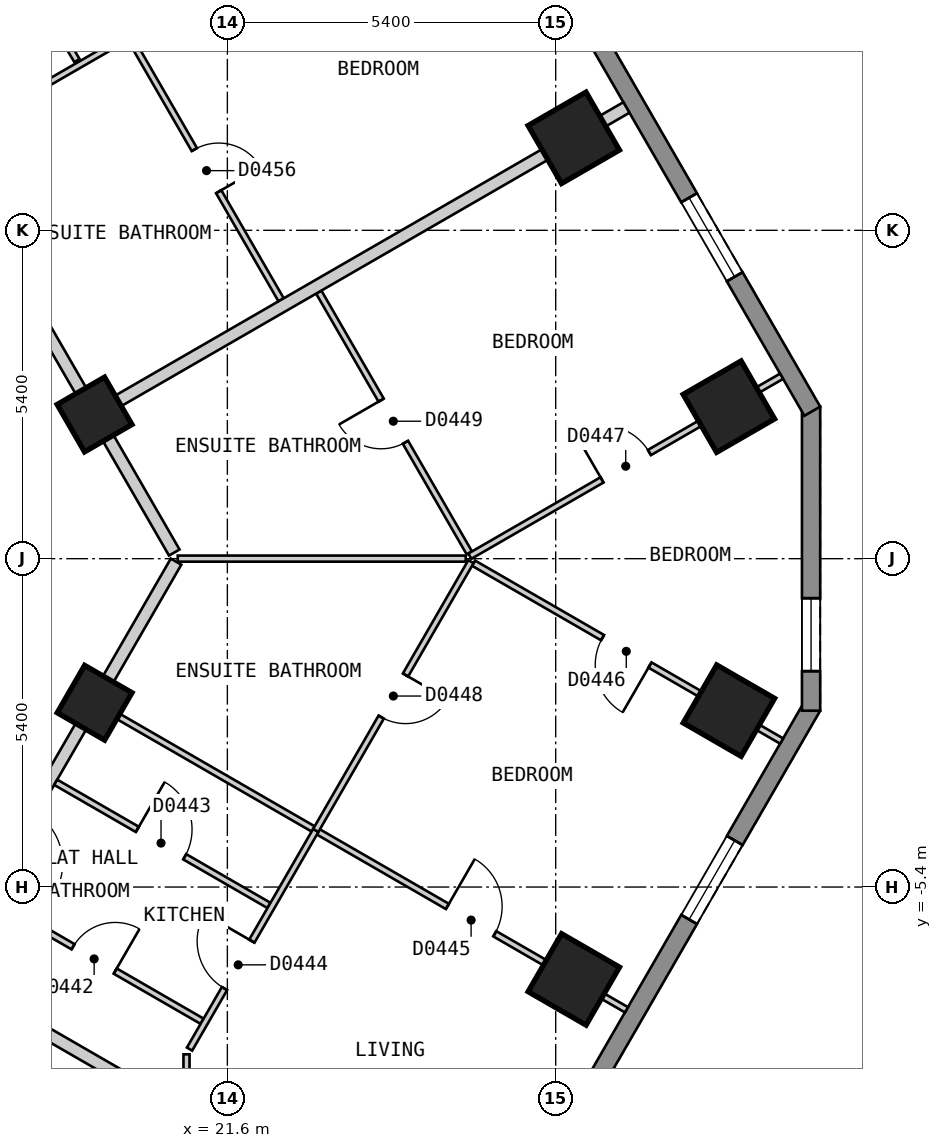
"""IFC4 building model, lengths in metres.
Left out: names, types, materials, properties, quantities, classifications, styles, units other than length and angle.
Written with IfcOpenShell. Run it as: python <this file> out.ifc"""

import sys

from ifc_helpers import new_model, si_unit, direction, frame, frame_2d, origin, origin_2d, place, context, subcontext, project, spatial, polyline, rectangle, outline, extrude, element, fill, save


model = new_model("IFC4")
c1 = context("Model", 3, precision=1e-05, world=origin(), true_north=direction((0.0, 1.0)))
c2 = subcontext(c1, "Body", "Model", "MODEL_VIEW")
j1 = project(units=[si_unit("LENGTHUNIT", "METRE"), si_unit("PLANEANGLEUNIT", "RADIAN")], contexts=[c1])
p1 = place(None, origin())
s1 = spatial("IfcSite", under=j1, at=p1, CompositionType="ELEMENT")
p2 = place(p1, origin())
s2 = spatial("IfcBuilding", under=s1, at=p2, CompositionType="ELEMENT")
p3 = place(p2, frame((0.0, 0.0, 26.4)))
s3 = spatial("IfcBuildingStorey", under=s2, at=p3, CompositionType="ELEMENT", Elevation=26.4)
for number, where, z_axis, x_axis in (
    (1, (27.298, -6.919, 0.0), (0.0, 0.0, 1.0), (0.5, 0.866, 0.0)),
    (2, (29.849, -2.499, 0.0), (0.0, 0.0, 1.0), (0.5, 0.866, 0.0)),
    (3, (29.848, 2.5, 0.0), (0.0, 0.0, 1.0), (-0.5, 0.866, 0.0)),
    (4, (27.297, 6.921, 0.0), (0.0, 0.0, 1.0), (-0.5, 0.866, 0.0)),
):
    element("IfcColumn", number, at=place(p3, frame(where, z_axis=z_axis, x_axis=x_axis)), inside=s3, PredefinedType="COLUMN", context=c2, shape_type="SweptSolid", body=[
        extrude(rectangle(XDim=1.1, YDim=1.1, at=origin_2d()), origin(), (0.0, 0.0, 1.0), 3.0),
    ])
for number, where, z_axis, x_axis in (
    (5, (19.417, -2.369, 0.0), (0.0, 0.0, 1.0), (0.5, 0.866, 0.0)),
    (6, (19.416, 2.371, 0.0), (0.0, 0.0, 1.0), (-0.5, 0.866, 0.0)),
):
    element("IfcColumn", number, at=place(p3, frame(where, z_axis=z_axis, x_axis=x_axis)), inside=s3, PredefinedType="COLUMN", context=c2, shape_type="SweptSolid", body=[
        extrude(rectangle(XDim=0.9, YDim=0.9, at=origin_2d()), origin(), (0.0, 0.0, 1.0), 3.0),
    ])
p4 = place(p3, frame((17.71, -25.825, 0.0), z_axis=(0.0, 0.0, 1.0), x_axis=(0.500001938803, 0.866024284413, 0.0)))
e7 = element("IfcWall", 7, at=p4, inside=s3, PredefinedType="SOLIDWALL", context=c2, shape_type="SweptSolid", body=[
    extrude(outline(polyline([(0.0, -0.15), (27.02, -0.15), (26.94, 0.15), (0.08, 0.15), (0.0, -0.15)])), origin(), (0.0, 0.0, 1.0), 2.7),
])
p5 = place(p4, frame((2.553, 0.0, 0.15)))
e8 = element("IfcOpeningElement", 8, at=p5, cuts=e7, PredefinedType="OPENING", context=c2, shape_type="SweptSolid", body=[
    extrude(rectangle(XDim=1.5, YDim=2.1, at=frame_2d((0.75, 1.05))), frame((0.0, 0.16, 0.0), z_axis=(0.0, -1.0, 0.0), x_axis=(1.0, 0.0, 0.0)), (0.0, 0.0, 1.0), 0.32),
])
p6 = place(p4, frame((7.658, 0.0, 0.15)))
e9 = element("IfcOpeningElement", 9, at=p6, cuts=e7, PredefinedType="OPENING", context=c2, shape_type="SweptSolid", body=[
    extrude(rectangle(XDim=1.5, YDim=2.1, at=frame_2d((0.75, 1.05))), frame((0.0, 0.16, 0.0), z_axis=(0.0, -1.0, 0.0), x_axis=(1.0, 0.0, 0.0)), (0.0, 0.0, 1.0), 0.32),
])
p7 = place(p4, frame((12.761, 0.0, 0.15)))
e10 = element("IfcOpeningElement", 10, at=p7, cuts=e7, PredefinedType="OPENING", context=c2, shape_type="SweptSolid", body=[
    extrude(rectangle(XDim=1.5, YDim=2.1, at=frame_2d((0.75, 1.05))), frame((0.0, 0.16, 0.0), z_axis=(0.0, -1.0, 0.0), x_axis=(1.0, 0.0, 0.0)), (0.0, 0.0, 1.0), 0.32),
])
p8 = place(p4, frame((17.865, 0.0, 0.15)))
e11 = element("IfcOpeningElement", 11, at=p8, cuts=e7, PredefinedType="OPENING", context=c2, shape_type="SweptSolid", body=[
    extrude(rectangle(XDim=1.5, YDim=2.1, at=frame_2d((0.75, 1.05))), frame((0.0, 0.16, 0.0), z_axis=(0.0, -1.0, 0.0), x_axis=(1.0, 0.0, 0.0)), (0.0, 0.0, 1.0), 0.32),
])
p9 = place(p4, frame((22.969, 0.0, 0.15)))
e12 = element("IfcOpeningElement", 12, at=p9, cuts=e7, PredefinedType="OPENING", context=c2, shape_type="SweptSolid", body=[
    extrude(rectangle(XDim=1.5, YDim=2.1, at=frame_2d((0.75, 1.05))), frame((0.0, 0.16, 0.0), z_axis=(0.0, -1.0, 0.0), x_axis=(1.0, 0.0, 0.0)), (0.0, 0.0, 1.0), 0.32),
])
p10 = place(p3, frame((31.2, -2.5, 0.0), z_axis=(0.0, 0.0, 1.0), x_axis=(0.0, 1.0, 0.0)))
e13 = element("IfcWall", 13, at=p10, inside=s3, PredefinedType="SOLIDWALL", context=c2, shape_type="SweptSolid", body=[
    extrude(outline(polyline([(0.0, -0.15), (5.0, -0.15), (4.92, 0.15), (0.08, 0.15), (0.0, -0.15)])), origin(), (0.0, 0.0, 1.0), 2.7),
])
p11 = place(p10, frame((0.65, 0.0, 0.15)))
e14 = element("IfcOpeningElement", 14, at=p11, cuts=e13, PredefinedType="OPENING", context=c2, shape_type="SweptSolid", body=[
    extrude(rectangle(XDim=1.2, YDim=2.1, at=frame_2d((0.6, 1.05))), frame((0.0, 0.16, 0.0), z_axis=(0.0, -1.0, 0.0), x_axis=(1.0, 0.0, 0.0)), (0.0, 0.0, 1.0), 0.32),
])
p12 = place(p3, frame((31.22, 2.425, 0.0), z_axis=(0.0, 0.0, 1.0), x_axis=(-0.500001938803, 0.866024284413, 0.0)))
e15 = element("IfcWall", 15, at=p12, inside=s3, PredefinedType="SOLIDWALL", context=c2, shape_type="SweptSolid", body=[
    extrude(outline(polyline([(0.0, -0.15), (27.02, -0.15), (26.94, 0.15), (0.08, 0.15), (0.0, -0.15)])), origin(), (0.0, 0.0, 1.0), 2.7),
])
p13 = place(p12, frame((2.553, 0.0, 0.15)))
e16 = element("IfcOpeningElement", 16, at=p13, cuts=e15, PredefinedType="OPENING", context=c2, shape_type="SweptSolid", body=[
    extrude(rectangle(XDim=1.5, YDim=2.1, at=frame_2d((0.75, 1.05))), frame((0.0, 0.16, 0.0), z_axis=(0.0, -1.0, 0.0), x_axis=(1.0, 0.0, 0.0)), (0.0, 0.0, 1.0), 0.32),
])
p14 = place(p12, frame((7.657, 0.0, 0.15)))
e17 = element("IfcOpeningElement", 17, at=p14, cuts=e15, PredefinedType="OPENING", context=c2, shape_type="SweptSolid", body=[
    extrude(rectangle(XDim=1.5, YDim=2.1, at=frame_2d((0.75, 1.05))), frame((0.0, 0.16, 0.0), z_axis=(0.0, -1.0, 0.0), x_axis=(1.0, 0.0, 0.0)), (0.0, 0.0, 1.0), 0.32),
])
p15 = place(p12, frame((12.761, 0.0, 0.15)))
e18 = element("IfcOpeningElement", 18, at=p15, cuts=e15, PredefinedType="OPENING", context=c2, shape_type="SweptSolid", body=[
    extrude(rectangle(XDim=1.5, YDim=2.1, at=frame_2d((0.75, 1.05))), frame((0.0, 0.16, 0.0), z_axis=(0.0, -1.0, 0.0), x_axis=(1.0, 0.0, 0.0)), (0.0, 0.0, 1.0), 0.32),
])
p16 = place(p12, frame((17.865, 0.0, 0.15)))
e19 = element("IfcOpeningElement", 19, at=p16, cuts=e15, PredefinedType="OPENING", context=c2, shape_type="SweptSolid", body=[
    extrude(rectangle(XDim=1.5, YDim=2.1, at=frame_2d((0.75, 1.05))), frame((0.0, 0.16, 0.0), z_axis=(0.0, -1.0, 0.0), x_axis=(1.0, 0.0, 0.0)), (0.0, 0.0, 1.0), 0.32),
])
p17 = place(p12, frame((22.969, 0.0, 0.15)))
e20 = element("IfcOpeningElement", 20, at=p17, cuts=e15, PredefinedType="OPENING", context=c2, shape_type="SweptSolid", body=[
    extrude(rectangle(XDim=1.5, YDim=2.1, at=frame_2d((0.75, 1.05))), frame((0.0, 0.16, 0.0), z_axis=(0.0, -1.0, 0.0), x_axis=(1.0, 0.0, 0.0)), (0.0, 0.0, 1.0), 0.32),
])
p18 = place(p3, frame((10.45, 17.9, 0.0), z_axis=(0.0, 0.0, 1.0), x_axis=(0.500034352617, -0.866005569383, 0.0)))
e21 = element("IfcWall", 21, at=p18, inside=s3, PredefinedType="PARTITIONING", context=c2, shape_type="SweptSolid", body=[
    extrude(rectangle(XDim=20.553, YDim=0.2, at=frame_2d((10.276, 0.0))), origin(), (0.0, 0.0, 1.0), 2.7),
])
p19 = place(p18, frame((9.775, 0.0, 0.0)))
e22 = element("IfcOpeningElement", 22, at=p19, cuts=e21, PredefinedType="OPENING", context=c2, shape_type="SweptSolid", body=[
    extrude(rectangle(XDim=1.0, YDim=2.1, at=frame_2d((0.5, 1.05))), frame((0.0, 0.11, 0.0), z_axis=(0.0, -1.0, 0.0), x_axis=(1.0, 0.0, 0.0)), (0.0, 0.0, 1.0), 0.22),
])
p20 = place(p18, frame((0.852, 0.0, 0.0)))
e23 = element("IfcOpeningElement", 23, at=p20, cuts=e21, PredefinedType="OPENING", context=c2, shape_type="SweptSolid", body=[
    extrude(rectangle(XDim=0.8, YDim=2.1, at=frame_2d((0.4, 1.05))), frame((0.0, 0.11, 0.0), z_axis=(0.0, -1.0, 0.0), x_axis=(1.0, 0.0, 0.0)), (0.0, 0.0, 1.0), 0.22),
])
p21 = place(p3, frame((15.707, -8.794, 0.0), z_axis=(0.0, 0.0, 1.0), x_axis=(0.500016151272, 0.866016078642, 0.0)))
e24 = element("IfcWall", 24, at=p21, inside=s3, PredefinedType="PARTITIONING", context=c2, shape_type="SweptSolid", body=[
    extrude(rectangle(XDim=10.098, YDim=0.2, at=frame_2d((5.049, 0.0))), origin(), (0.0, 0.0, 1.0), 2.7),
])
p22 = place(p21, frame((4.367, 0.0, 0.0)))
e25 = element("IfcOpeningElement", 25, at=p22, cuts=e24, PredefinedType="OPENING", context=c2, shape_type="SweptSolid", body=[
    extrude(rectangle(XDim=1.0, YDim=2.1, at=frame_2d((0.5, 1.05))), frame((0.0, 0.11, 0.0), z_axis=(0.0, -1.0, 0.0), x_axis=(1.0, 0.0, 0.0)), (0.0, 0.0, 1.0), 0.22),
])
p23 = place(p3, frame((17.485, 10.957, 0.0), z_axis=(0.0, 0.0, 1.0), x_axis=(0.510324709283, -0.859981796956, 0.0)))
e26 = element("IfcWall", 26, at=p23, inside=s3, PredefinedType="PARTITIONING", context=c2, shape_type="SweptSolid", body=[
    extrude(rectangle(XDim=3.215, YDim=0.1, at=frame_2d((1.608, 0.0))), origin(), (0.0, 0.0, 1.0), 2.7),
])
p24 = place(p3, frame((20.006, 8.548, 0.0), z_axis=(0.0, 0.0, 1.0), x_axis=(0.500055121407, -0.865993577086, 0.0)))
e27 = element("IfcWall", 27, at=p24, inside=s3, PredefinedType="PARTITIONING", context=c2, shape_type="SweptSolid", body=[
    extrude(rectangle(XDim=4.955, YDim=0.1, at=frame_2d((2.478, 0.0))), origin(), (0.0, 0.0, 1.0), 2.7),
])
p25 = place(p24, frame((2.102, 0.0, 0.0)))
e28 = element("IfcOpeningElement", 28, at=p25, cuts=e27, PredefinedType="OPENING", context=c2, shape_type="SweptSolid", body=[
    extrude(rectangle(XDim=0.8, YDim=2.1, at=frame_2d((0.4, 1.05))), frame((0.0, 0.06, 0.0), z_axis=(0.0, -1.0, 0.0), x_axis=(1.0, 0.0, 0.0)), (0.0, 0.0, 1.0), 0.12),
])
p26 = place(p3, frame((23.103, 4.384, 0.0), z_axis=(0.0, 0.0, 1.0), x_axis=(0.500029609304, -0.86600830817, 0.0)))
e29 = element("IfcWall", 29, at=p26, inside=s3, PredefinedType="PARTITIONING", context=c2, shape_type="SweptSolid", body=[
    extrude(rectangle(XDim=4.954, YDim=0.1, at=frame_2d((2.477, 0.0))), origin(), (0.0, 0.0, 1.0), 2.7),
])
p27 = place(p26, frame((2.052, 0.0, 0.0)))
e30 = element("IfcOpeningElement", 30, at=p27, cuts=e29, PredefinedType="OPENING", context=c2, shape_type="SweptSolid", body=[
    extrude(rectangle(XDim=0.8, YDim=2.1, at=frame_2d((0.4, 1.05))), frame((0.0, 0.06, 0.0), z_axis=(0.0, -1.0, 0.0), x_axis=(1.0, 0.0, 0.0)), (0.0, 0.0, 1.0), 0.12),
])
p28 = place(p3, frame((17.677, -5.582, 0.0), z_axis=(0.0, 0.0, 1.0), x_axis=(0.866015917575, -0.500016430238, 0.0)))
e31 = element("IfcWall", 31, at=p28, inside=s3, PredefinedType="PARTITIONING", context=c2, shape_type="SweptSolid", body=[
    extrude(rectangle(XDim=4.05, YDim=0.1, at=frame_2d((2.025, 0.0))), origin(), (0.0, 0.0, 1.0), 2.7),
])
p29 = place(p28, frame((1.6, 0.0, 0.0)))
e32 = element("IfcOpeningElement", 32, at=p29, cuts=e31, PredefinedType="OPENING", context=c2, shape_type="SweptSolid", body=[
    extrude(rectangle(XDim=0.8, YDim=2.1, at=frame_2d((0.4, 1.05))), frame((0.0, 0.06, 0.0), z_axis=(0.0, -1.0, 0.0), x_axis=(1.0, 0.0, 0.0)), (0.0, 0.0, 1.0), 0.12),
])
p30 = place(p3, frame((18.777, -3.677, 0.0), z_axis=(0.0, 0.0, 1.0), x_axis=(0.866000843773, -0.500042536776, 0.0)))
e33 = element("IfcWall", 33, at=p30, inside=s3, PredefinedType="PARTITIONING", context=c2, shape_type="SweptSolid", body=[
    extrude(rectangle(XDim=4.05, YDim=0.1, at=frame_2d((2.025, 0.0))), origin(), (0.0, 0.0, 1.0), 2.7),
])
p31 = place(p30, frame((1.55, 0.0, 0.0)))
e34 = element("IfcOpeningElement", 34, at=p31, cuts=e33, PredefinedType="OPENING", context=c2, shape_type="SweptSolid", body=[
    extrude(rectangle(XDim=0.9, YDim=2.1, at=frame_2d((0.45, 1.05))), frame((0.0, 0.06, 0.0), z_axis=(0.0, -1.0, 0.0), x_axis=(1.0, 0.0, 0.0)), (0.0, 0.0, 1.0), 0.12),
])
p32 = place(p3, frame((19.503, -2.419, 0.0), z_axis=(0.0, 0.0, 1.0), x_axis=(0.866047370643, -0.499961950354, 0.0)))
e35 = element("IfcWall", 35, at=p32, inside=s3, PredefinedType="PARTITIONING", context=c2, shape_type="SweptSolid", body=[
    extrude(rectangle(XDim=10.001, YDim=0.1, at=frame_2d((5.0, 0.0))), origin(), (0.0, 0.0, 1.0), 2.7),
])
p33 = place(p32, frame((6.6, 0.0, 0.0)))
e36 = element("IfcOpeningElement", 36, at=p33, cuts=e35, PredefinedType="OPENING", context=c2, shape_type="SweptSolid", body=[
    extrude(rectangle(XDim=0.9, YDim=2.1, at=frame_2d((0.45, 1.05))), frame((0.0, 0.06, 0.0), z_axis=(0.0, -1.0, 0.0), x_axis=(1.0, 0.0, 0.0)), (0.0, 0.0, 1.0), 0.12),
])
p34 = place(p3, frame((25.649, -0.074, 0.0), z_axis=(0.0, 0.0, 1.0), x_axis=(0.866059819573, -0.499940385368, 0.0)))
e37 = element("IfcWall", 37, at=p34, inside=s3, PredefinedType="PARTITIONING", context=c2, shape_type="SweptSolid", body=[
    extrude(rectangle(XDim=5.851, YDim=0.1, at=frame_2d((2.925, 0.0))), origin(), (0.0, 0.0, 1.0), 2.7),
])
p35 = place(p34, frame((2.45, 0.0, 0.0)))
e38 = element("IfcOpeningElement", 38, at=p35, cuts=e37, PredefinedType="OPENING", context=c2, shape_type="SweptSolid", body=[
    extrude(rectangle(XDim=0.9, YDim=2.1, at=frame_2d((0.45, 1.05))), frame((0.0, 0.06, 0.0), z_axis=(0.0, -1.0, 0.0), x_axis=(1.0, 0.0, 0.0)), (0.0, 0.0, 1.0), 0.12),
])
p36 = place(p3, frame((20.784, 0.001, 0.0), z_axis=(0.0, 0.0, 1.0), x_axis=(1.0, 0.0, 0.0)))
e39 = element("IfcWall", 39, at=p36, inside=s3, PredefinedType="PARTITIONING", context=c2, shape_type="SweptSolid", body=[
    extrude(rectangle(XDim=4.736, YDim=0.1, at=frame_2d((2.368, 0.0))), origin(), (0.0, 0.0, 1.0), 2.7),
])
p37 = place(p3, frame((20.978, -8.065, 0.0), z_axis=(0.0, 0.0, 1.0), x_axis=(0.499965068118, 0.866045570776, 0.0)))
e40 = element("IfcWall", 40, at=p37, inside=s3, PredefinedType="PARTITIONING", context=c2, shape_type="SweptSolid", body=[
    extrude(rectangle(XDim=4.152, YDim=0.1, at=frame_2d((2.076, 0.0))), origin(), (0.0, 0.0, 1.0), 2.7),
])
p38 = place(p37, frame((1.15, 0.0, 0.0)))
e41 = element("IfcOpeningElement", 41, at=p38, cuts=e40, PredefinedType="OPENING", context=c2, shape_type="SweptSolid", body=[
    extrude(rectangle(XDim=0.9, YDim=2.1, at=frame_2d((0.45, 1.05))), frame((0.0, 0.06, 0.0), z_axis=(0.0, -1.0, 0.0), x_axis=(1.0, 0.0, 0.0)), (0.0, 0.0, 1.0), 0.12),
])
p39 = place(p3, frame((20.928, -9.02, 0.0), z_axis=(0.0, 0.0, 1.0), x_axis=(0.0, 1.0, 0.0)))
e42 = element("IfcWall", 42, at=p39, inside=s3, PredefinedType="PARTITIONING", context=c2, shape_type="SweptSolid", body=[
    extrude(rectangle(XDim=0.869, YDim=0.1, at=frame_2d((0.435, 0.0))), origin(), (0.0, 0.0, 1.0), 2.7),
])
p40 = place(p3, frame((25.588, 0.041, 0.0), z_axis=(0.0, 0.0, 1.0), x_axis=(0.866113484451, 0.499847408768, 0.0)))
e43 = element("IfcWall", 43, at=p40, inside=s3, PredefinedType="PARTITIONING", context=c2, shape_type="SweptSolid", body=[
    extrude(rectangle(XDim=5.92, YDim=0.1, at=frame_2d((2.96, 0.0))), origin(), (0.0, 0.0, 1.0), 2.7),
])
p41 = place(p40, frame((2.51, 0.0, 0.0)))
e44 = element("IfcOpeningElement", 44, at=p41, cuts=e43, PredefinedType="OPENING", context=c2, shape_type="SweptSolid", body=[
    extrude(rectangle(XDim=0.9, YDim=2.1, at=frame_2d((0.45, 1.05))), frame((0.0, 0.06, 0.0), z_axis=(0.0, -1.0, 0.0), x_axis=(1.0, 0.0, 0.0)), (0.0, 0.0, 1.0), 0.12),
])
p42 = place(p3, frame((16.95, 6.841, 0.0), z_axis=(0.0, 0.0, 1.0), x_axis=(0.866022959057, 0.500004234368, 0.0)))
e45 = element("IfcWall", 45, at=p42, inside=s3, PredefinedType="PARTITIONING", context=c2, shape_type="SweptSolid", body=[
    extrude(rectangle(XDim=10.0, YDim=0.1, at=frame_2d((5.0, 0.0))), origin(), (0.0, 0.0, 1.0), 2.7),
])
p43 = place(p42, frame((4.795, 0.0, 0.0)))
e46 = element("IfcOpeningElement", 46, at=p43, cuts=e45, PredefinedType="OPENING", context=c2, shape_type="SweptSolid", body=[
    extrude(rectangle(XDim=0.9, YDim=2.1, at=frame_2d((0.45, 1.05))), frame((0.0, 0.06, 0.0), z_axis=(0.0, -1.0, 0.0), x_axis=(1.0, 0.0, 0.0)), (0.0, 0.0, 1.0), 0.12),
])
p44 = place(p3, frame((16.951, -6.839, 0.0), z_axis=(0.0, 0.0, 1.0), x_axis=(0.866022959057, -0.500004234368, 0.0)))
e47 = element("IfcWall", 47, at=p44, inside=s3, PredefinedType="PARTITIONING", context=c2, shape_type="SweptSolid", body=[
    extrude(rectangle(XDim=10.0, YDim=0.2, at=frame_2d((5.0, 0.0))), origin(), (0.0, 0.0, 1.0), 2.7),
])
p45 = place(p3, frame((19.503, 2.421, 0.0), z_axis=(0.0, 0.0, 1.0), x_axis=(0.866065245018, 0.499930986609, 0.0)))
e48 = element("IfcWall", 48, at=p45, inside=s3, PredefinedType="PARTITIONING", context=c2, shape_type="SweptSolid", body=[
    extrude(rectangle(XDim=10.0, YDim=0.2, at=frame_2d((5.0, 0.0))), origin(), (0.0, 0.0, 1.0), 2.7),
])
p46 = place(p3, frame((23.054, -4.469, 0.0), z_axis=(0.0, 0.0, 1.0), x_axis=(0.500023345639, 0.866011924754, 0.0)))
e49 = element("IfcWall", 49, at=p46, inside=s3, PredefinedType="PARTITIONING", context=c2, shape_type="SweptSolid", body=[
    extrude(rectangle(XDim=5.104, YDim=0.1, at=frame_2d((2.552, 0.0))), origin(), (0.0, 0.0, 1.0), 2.7),
])
p47 = place(p46, frame((2.152, 0.0, 0.0)))
e50 = element("IfcOpeningElement", 50, at=p47, cuts=e49, PredefinedType="OPENING", context=c2, shape_type="SweptSolid", body=[
    extrude(rectangle(XDim=0.8, YDim=2.1, at=frame_2d((0.4, 1.05))), frame((0.0, 0.06, 0.0), z_axis=(0.0, -1.0, 0.0), x_axis=(1.0, 0.0, 0.0)), (0.0, 0.0, 1.0), 0.12),
])
p48 = place(p9, origin())
e51 = element("IfcWindow", 51, at=p48, inside=s3, PartitioningType="SINGLE_PANEL", PredefinedType="WINDOW", context=c2, shape_type="SweptSolid", body=[
    extrude(rectangle(XDim=1.5, YDim=2.1, at=frame_2d((0.75, 1.05))), frame((0.0, 0.03, 0.0), z_axis=(0.0, -1.0, 0.0), x_axis=(1.0, 0.0, 0.0)), (0.0, 0.0, 1.0), 0.06),
])
fill(e12, e51)
p49 = place(p11, origin())
e52 = element("IfcWindow", 52, at=p49, inside=s3, PartitioningType="SINGLE_PANEL", PredefinedType="WINDOW", context=c2, shape_type="SweptSolid", body=[
    extrude(rectangle(XDim=1.2, YDim=2.1, at=frame_2d((0.6, 1.05))), frame((0.0, 0.03, 0.0), z_axis=(0.0, -1.0, 0.0), x_axis=(1.0, 0.0, 0.0)), (0.0, 0.0, 1.0), 0.06),
])
fill(e14, e52)
p50 = place(p13, origin())
e53 = element("IfcWindow", 53, at=p50, inside=s3, PartitioningType="SINGLE_PANEL", PredefinedType="WINDOW", context=c2, shape_type="SweptSolid", body=[
    extrude(rectangle(XDim=1.5, YDim=2.1, at=frame_2d((0.75, 1.05))), frame((0.0, 0.03, 0.0), z_axis=(0.0, -1.0, 0.0), x_axis=(1.0, 0.0, 0.0)), (0.0, 0.0, 1.0), 0.06),
])
fill(e16, e53)
p51 = place(p29, origin())
e54 = element("IfcDoor", 54, at=p51, inside=s3, OperationType="SINGLE_SWING_RIGHT", PredefinedType="DOOR", context=c2, shape_type="SweptSolid", body=[
    extrude(rectangle(XDim=0.8, YDim=2.1, at=frame_2d((0.4, 1.05))), frame((0.0, 0.025, 0.0), z_axis=(0.0, -1.0, 0.0), x_axis=(1.0, 0.0, 0.0)), (0.0, 0.0, 1.0), 0.05),
])
fill(e32, e54)
p52 = place(p31, origin())
e55 = element("IfcDoor", 55, at=p52, inside=s3, OperationType="SINGLE_SWING_LEFT", PredefinedType="DOOR", context=c2, shape_type="SweptSolid", body=[
    extrude(rectangle(XDim=0.9, YDim=2.1, at=frame_2d((0.45, 1.05))), frame((0.0, 0.025, 0.0), z_axis=(0.0, -1.0, 0.0), x_axis=(1.0, 0.0, 0.0)), (0.0, 0.0, 1.0), 0.05),
])
fill(e34, e55)
p53 = place(p38, origin())
e56 = element("IfcDoor", 56, at=p53, inside=s3, OperationType="SINGLE_SWING_RIGHT", PredefinedType="DOOR", context=c2, shape_type="SweptSolid", body=[
    extrude(rectangle(XDim=0.9, YDim=2.1, at=frame_2d((0.45, 1.05))), frame((0.0, 0.025, 0.0), z_axis=(0.0, -1.0, 0.0), x_axis=(1.0, 0.0, 0.0)), (0.0, 0.0, 1.0), 0.05),
])
fill(e41, e56)
p54 = place(p33, origin())
e57 = element("IfcDoor", 57, at=p54, inside=s3, OperationType="SINGLE_SWING_LEFT", PredefinedType="DOOR", context=c2, shape_type="SweptSolid", body=[
    extrude(rectangle(XDim=0.9, YDim=2.1, at=frame_2d((0.45, 1.05))), frame((0.0, 0.025, 0.0), z_axis=(0.0, -1.0, 0.0), x_axis=(1.0, 0.0, 0.0)), (0.0, 0.0, 1.0), 0.05),
])
fill(e36, e57)
p55 = place(p35, origin())
e58 = element("IfcDoor", 58, at=p55, inside=s3, OperationType="SINGLE_SWING_RIGHT", PredefinedType="DOOR", context=c2, shape_type="SweptSolid", body=[
    extrude(rectangle(XDim=0.9, YDim=2.1, at=frame_2d((0.45, 1.05))), frame((0.0, 0.025, 0.0), z_axis=(0.0, -1.0, 0.0), x_axis=(1.0, 0.0, 0.0)), (0.0, 0.0, 1.0), 0.05),
])
fill(e38, e58)
p56 = place(p41, origin())
e59 = element("IfcDoor", 59, at=p56, inside=s3, OperationType="SINGLE_SWING_LEFT", PredefinedType="DOOR", context=c2, shape_type="SweptSolid", body=[
    extrude(rectangle(XDim=0.9, YDim=2.1, at=frame_2d((0.45, 1.05))), frame((0.0, 0.025, 0.0), z_axis=(0.0, -1.0, 0.0), x_axis=(1.0, 0.0, 0.0)), (0.0, 0.0, 1.0), 0.05),
])
fill(e44, e59)
p57 = place(p47, origin())
e60 = element("IfcDoor", 60, at=p57, inside=s3, OperationType="SINGLE_SWING_RIGHT", PredefinedType="DOOR", context=c2, shape_type="SweptSolid", body=[
    extrude(rectangle(XDim=0.8, YDim=2.1, at=frame_2d((0.4, 1.05))), frame((0.0, 0.025, 0.0), z_axis=(0.0, -1.0, 0.0), x_axis=(1.0, 0.0, 0.0)), (0.0, 0.0, 1.0), 0.05),
])
fill(e50, e60)
p58 = place(p27, origin())
e61 = element("IfcDoor", 61, at=p58, inside=s3, OperationType="SINGLE_SWING_LEFT", PredefinedType="DOOR", context=c2, shape_type="SweptSolid", body=[
    extrude(rectangle(XDim=0.8, YDim=2.1, at=frame_2d((0.4, 1.05))), frame((0.0, 0.025, 0.0), z_axis=(0.0, -1.0, 0.0), x_axis=(1.0, 0.0, 0.0)), (0.0, 0.0, 1.0), 0.05),
])
fill(e30, e61)
p59 = place(p25, origin())
e62 = element("IfcDoor", 62, at=p59, inside=s3, OperationType="SINGLE_SWING_RIGHT", PredefinedType="DOOR", context=c2, shape_type="SweptSolid", body=[
    extrude(rectangle(XDim=0.8, YDim=2.1, at=frame_2d((0.4, 1.05))), frame((0.0, 0.025, 0.0), z_axis=(0.0, -1.0, 0.0), x_axis=(1.0, 0.0, 0.0)), (0.0, 0.0, 1.0), 0.05),
])
fill(e28, e62)
save(model, sys.argv[1])
